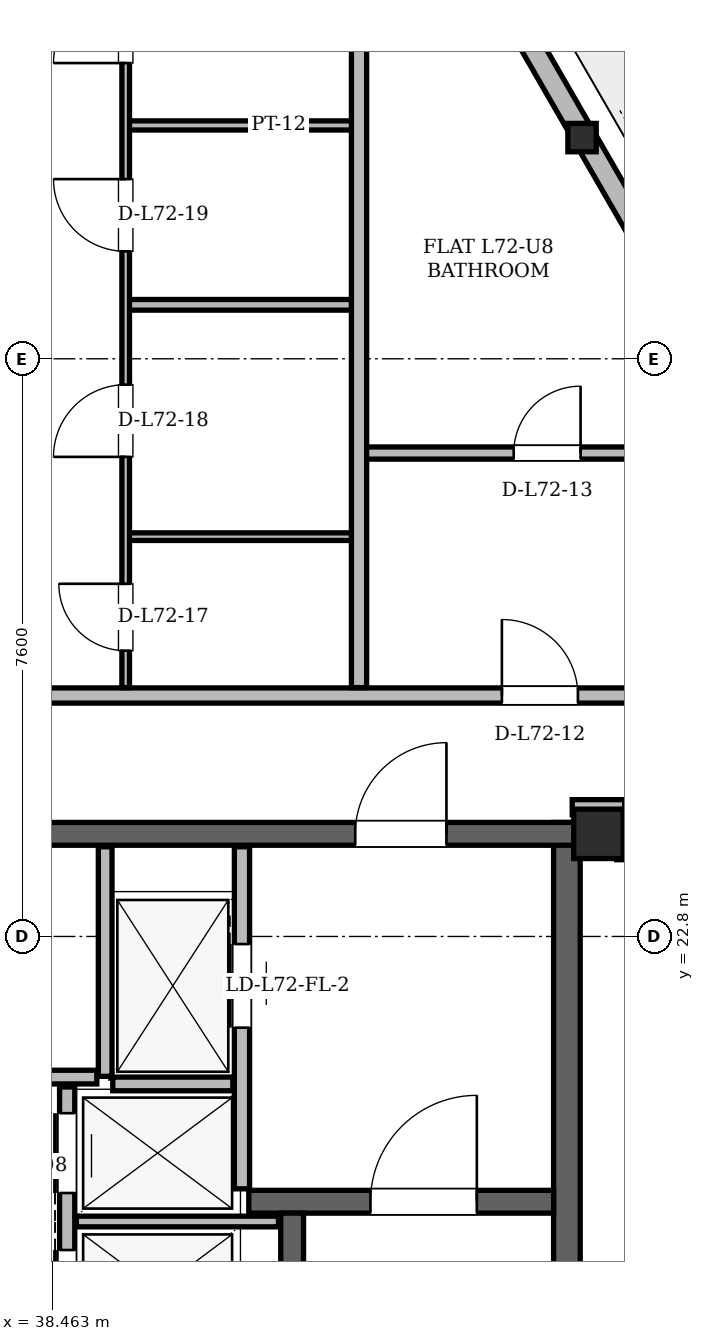
"""IFC4 building model, lengths in metres.
Left out: names, types, materials, properties, quantities, classifications, styles, units other than length and angle.
Written with IfcOpenShell. Run it as: python <this file> out.ifc"""

import sys

from ifc_helpers import new_model, si_unit, direction, frame, frame_2d, origin, origin_2d, place, context, subcontext, project, spatial, rectangle, hollow_rectangle, i_section, extrude, element, fill, save


model = new_model("IFC4")
c1 = context("Model", 3, precision=1e-05, world=origin(), true_north=direction((0.0, 1.0)))
c2 = subcontext(c1, "Body", "Model", "MODEL_VIEW")
j1 = project(units=[si_unit("LENGTHUNIT", "METRE"), si_unit("PLANEANGLEUNIT", "RADIAN")], contexts=[c1])
p1 = place(None, origin())
s1 = spatial("IfcSite", under=j1, at=p1, CompositionType="ELEMENT")
p2 = place(p1, origin())
s2 = spatial("IfcBuilding", under=s1, at=p2, CompositionType="ELEMENT")
p3 = place(p2, frame((0.0, 0.0, 273.3)))
s3 = spatial("IfcBuildingStorey", under=s2, at=p3, CompositionType="ELEMENT", Elevation=273.3)
p4 = place(p3, frame((45.65, 24.15, 0.0), z_axis=(0.0, 0.0, 1.0), x_axis=(1.0, 0.0, 0.0)))
e1 = element("IfcColumn", 1, at=p4, inside=s3, PredefinedType="COLUMN", context=c2, shape_type="SweptSolid", body=[
    extrude(hollow_rectangle(XDim=0.65, YDim=0.65, WallThickness=0.05, at=origin_2d()), origin(), (0.0, 0.0, 1.0), 3.9),
])
p5 = place(p3, frame((45.462, 33.321, 0.004), z_axis=(-0.01430375695, -0.005458012521, 0.99988279945), x_axis=(0.356506481981, -0.934292849328, 0.0)))
e2 = element("IfcColumn", 2, at=p5, inside=s3, PredefinedType="COLUMN", context=c2, shape_type="SweptSolid", body=[
    extrude(i_section(OverallWidth=0.373, OverallDepth=0.373, WebThickness=0.016, FlangeThickness=0.026, at=origin_2d()), origin(), (0.0, 0.0, 1.0), 3.892),
])
p6 = place(p3, frame((45.235, 11.0, 0.0), z_axis=(0.0, 0.0, 1.0), x_axis=(0.0, 1.0, 0.0)))
e3 = element("IfcWall", 3, at=p6, inside=s3, PredefinedType="SHEAR", context=c2, shape_type="SweptSolid", body=[
    extrude(rectangle(XDim=13.3, YDim=0.35, at=frame_2d((6.65, 0.0))), origin(), (0.0, 0.0, 1.0), 3.68),
])
p7 = place(p3, frame((29.65, 24.15, 0.0), z_axis=(0.0, 0.0, 1.0), x_axis=(1.0, 0.0, 0.0)))
e4 = element("IfcWall", 4, at=p7, inside=s3, PredefinedType="SHEAR", context=c2, shape_type="SweptSolid", body=[
    extrude(rectangle(XDim=15.7, YDim=0.3, at=frame_2d((7.85, 0.0))), origin(), (0.0, 0.0, 1.0), 3.68),
])
p8 = place(p7, frame((1.7, 0.0, 0.0)))
e5 = element("IfcOpeningElement", 5, at=p8, cuts=e4, PredefinedType="OPENING", context=c2, shape_type="SweptSolid", body=[
    extrude(rectangle(XDim=1.2, YDim=2.2, at=frame_2d((0.6, 1.1))), frame((0.0, 0.15, 0.0), z_axis=(0.0, -1.0, 0.0), x_axis=(1.0, 0.0, 0.0)), (0.0, 0.0, 1.0), 0.3),
])
p9 = place(p7, frame((12.8, 0.0, 0.0)))
e6 = element("IfcOpeningElement", 6, at=p9, cuts=e4, PredefinedType="OPENING", context=c2, shape_type="SweptSolid", body=[
    extrude(rectangle(XDim=1.2, YDim=2.2, at=frame_2d((0.6, 1.1))), frame((0.0, 0.15, 0.0), z_axis=(0.0, -1.0, 0.0), x_axis=(1.0, 0.0, 0.0)), (0.0, 0.0, 1.0), 0.3),
])
p10 = place(p7, frame((7.4, 0.0, 0.0)))
e7 = element("IfcOpeningElement", 7, at=p10, cuts=e4, PredefinedType="OPENING", context=c2, shape_type="SweptSolid", body=[
    extrude(rectangle(XDim=0.9, YDim=2.05, at=frame_2d((0.45, 1.025))), frame((0.0, 0.15, 0.0), z_axis=(0.0, -1.0, 0.0), x_axis=(1.0, 0.0, 0.0)), (0.0, 0.0, 1.0), 0.3),
])
p11 = place(p3, frame((41.05, 19.31, 0.0), z_axis=(0.0, 0.0, 1.0), x_axis=(1.0, 0.0, 0.0)))
e8 = element("IfcWall", 8, at=p11, inside=s3, PredefinedType="SHEAR", context=c2, shape_type="SweptSolid", body=[
    extrude(rectangle(XDim=4.01, YDim=0.3, at=frame_2d((2.005, 0.0))), origin(), (0.0, 0.0, 1.0), 3.68),
])
p12 = place(p11, frame((1.6, 0.0, 0.0)))
e9 = element("IfcOpeningElement", 9, at=p12, cuts=e8, PredefinedType="OPENING", context=c2, shape_type="SweptSolid", body=[
    extrude(rectangle(XDim=1.4, YDim=2.2, at=frame_2d((0.7, 1.1))), frame((0.0, 0.15, 0.0), z_axis=(0.0, -1.0, 0.0), x_axis=(1.0, 0.0, 0.0)), (0.0, 0.0, 1.0), 0.3),
])
p13 = place(p3, frame((41.62, 11.54, 0.0), z_axis=(0.0, 0.0, 1.0), x_axis=(0.0, 1.0, 0.0)))
e10 = element("IfcWall", 10, at=p13, inside=s3, PredefinedType="SHEAR", context=c2, shape_type="SweptSolid", body=[
    extrude(rectangle(XDim=7.62, YDim=0.3, at=frame_2d((3.81, 0.0))), origin(), (0.0, 0.0, 1.0), 3.68),
])
p14 = place(p3, frame((58.532, 10.683, 0.0), z_axis=(0.0, 0.0, 1.0), x_axis=(-0.499999381892, 0.866025760649, 0.0)))
e11 = element("IfcWall", 11, at=p14, inside=s3, PredefinedType="SOLIDWALL", context=c2, shape_type="SweptSolid", body=[
    extrude(rectangle(XDim=37.343, YDim=0.29, at=frame_2d((18.671, 0.0))), origin(), (0.0, 0.0, 1.0), 3.058),
])
p15 = place(p14, frame((6.789, 0.0, 0.0)))
e12 = element("IfcOpeningElement", 12, at=p15, cuts=e11, PredefinedType="OPENING", context=c2, shape_type="SweptSolid", body=[
    extrude(rectangle(XDim=1.5, YDim=2.2, at=frame_2d((0.75, 1.1))), frame((0.0, 0.145, 0.0), z_axis=(0.0, -1.0, 0.0), x_axis=(1.0, 0.0, 0.0)), (0.0, 0.0, 1.0), 0.29),
])
p16 = place(p14, frame((27.808, 0.0, 0.0)))
e13 = element("IfcOpeningElement", 13, at=p16, cuts=e11, PredefinedType="OPENING", context=c2, shape_type="SweptSolid", body=[
    extrude(rectangle(XDim=1.5, YDim=2.2, at=frame_2d((0.75, 1.1))), frame((0.0, 0.145, 0.0), z_axis=(0.0, -1.0, 0.0), x_axis=(1.0, 0.0, 0.0)), (0.0, 0.0, 1.0), 0.29),
])
p17 = place(p14, frame((0.901, 0.0, 0.85)))
e14 = element("IfcOpeningElement", 14, at=p17, cuts=e11, PredefinedType="OPENING", context=c2, shape_type="SweptSolid", body=[
    extrude(rectangle(XDim=1.2, YDim=1.48, at=frame_2d((0.6, 0.74))), frame((0.0, 0.145, 0.0), z_axis=(0.0, -1.0, 0.0), x_axis=(1.0, 0.0, 0.0)), (0.0, 0.0, 1.0), 0.29),
])
p18 = place(p14, frame((12.688, 0.0, 0.85)))
e15 = element("IfcOpeningElement", 15, at=p18, cuts=e11, PredefinedType="OPENING", context=c2, shape_type="SweptSolid", body=[
    extrude(rectangle(XDim=3.0, YDim=2.098, at=frame_2d((1.5, 1.049))), frame((0.0, 0.145, 0.0), z_axis=(0.0, -1.0, 0.0), x_axis=(1.0, 0.0, 0.0)), (0.0, 0.0, 1.0), 0.29),
])
p19 = place(p14, frame((17.814, 0.0, 0.85)))
e16 = element("IfcOpeningElement", 16, at=p19, cuts=e11, PredefinedType="OPENING", context=c2, shape_type="SweptSolid", body=[
    extrude(rectangle(XDim=2.6, YDim=1.95, at=frame_2d((1.3, 0.975))), frame((0.0, 0.145, 0.0), z_axis=(0.0, -1.0, 0.0), x_axis=(1.0, 0.0, 0.0)), (0.0, 0.0, 1.0), 0.29),
])
p20 = place(p14, frame((35.362, 0.0, 0.85)))
e17 = element("IfcOpeningElement", 17, at=p20, cuts=e11, PredefinedType="OPENING", context=c2, shape_type="SweptSolid", body=[
    extrude(rectangle(XDim=1.2, YDim=1.48, at=frame_2d((0.6, 0.74))), frame((0.0, 0.145, 0.0), z_axis=(0.0, -1.0, 0.0), x_axis=(1.0, 0.0, 0.0)), (0.0, 0.0, 1.0), 0.29),
])
p21 = place(p14, frame((33.788, 0.0, 0.85)))
e18 = element("IfcOpeningElement", 18, at=p21, cuts=e11, PredefinedType="OPENING", context=c2, shape_type="SweptSolid", body=[
    extrude(rectangle(XDim=1.2, YDim=1.48, at=frame_2d((0.6, 0.74))), frame((0.0, 0.145, 0.0), z_axis=(0.0, -1.0, 0.0), x_axis=(1.0, 0.0, 0.0)), (0.0, 0.0, 1.0), 0.29),
])
p22 = place(p14, frame((22.74, 0.0, 0.85)))
e19 = element("IfcOpeningElement", 19, at=p22, cuts=e11, PredefinedType="OPENING", context=c2, shape_type="SweptSolid", body=[
    extrude(rectangle(XDim=1.2, YDim=1.48, at=frame_2d((0.6, 0.74))), frame((0.0, 0.145, 0.0), z_axis=(0.0, -1.0, 0.0), x_axis=(1.0, 0.0, 0.0)), (0.0, 0.0, 1.0), 0.29),
])
p23 = place(p14, frame((31.705, 0.0, 0.85)))
e20 = element("IfcOpeningElement", 20, at=p23, cuts=e11, PredefinedType="OPENING", context=c2, shape_type="SweptSolid", body=[
    extrude(rectangle(XDim=1.2, YDim=1.48, at=frame_2d((0.6, 0.74))), frame((0.0, 0.145, 0.0), z_axis=(0.0, -1.0, 0.0), x_axis=(1.0, 0.0, 0.0)), (0.0, 0.0, 1.0), 0.29),
])
p24 = place(p3, frame((40.96, 19.48, 0.0), z_axis=(0.0, 0.0, 1.0), x_axis=(0.0, 1.0, 0.0)))
e21 = element("IfcWall", 21, at=p24, inside=s3, PredefinedType="PARTITIONING", context=c2, shape_type="SweptSolid", body=[
    extrude(rectangle(XDim=4.5, YDim=0.2, at=frame_2d((2.25, 0.0))), origin(), (0.0, 0.0, 1.0), 3.68),
])
p25 = place(p24, frame((2.12, 0.0, 0.0)))
e22 = element("IfcOpeningElement", 22, at=p25, cuts=e21, PredefinedType="OPENING", context=c2, shape_type="SweptSolid", body=[
    extrude(rectangle(XDim=1.1, YDim=2.2, at=frame_2d((0.55, 1.1))), frame((0.0, 0.1, 0.0), z_axis=(0.0, -1.0, 0.0), x_axis=(1.0, 0.0, 0.0)), (0.0, 0.0, 1.0), 0.2),
])
p26 = place(p3, frame((39.16, 20.96, 0.0), z_axis=(0.0, 0.0, 1.0), x_axis=(0.0, 1.0, 0.0)))
e23 = element("IfcWall", 23, at=p26, inside=s3, PredefinedType="PARTITIONING", context=c2, shape_type="SweptSolid", body=[
    extrude(rectangle(XDim=3.02, YDim=0.18, at=frame_2d((1.51, 0.0))), origin(), (0.0, 0.0, 1.0), 3.68),
])
p27 = place(p3, frame((39.26, 20.86, 0.0), z_axis=(0.0, 0.0, 1.0), x_axis=(1.0, 0.0, 0.0)))
e24 = element("IfcWall", 24, at=p27, inside=s3, PredefinedType="PARTITIONING", context=c2, shape_type="SweptSolid", body=[
    extrude(rectangle(XDim=1.58, YDim=0.18, at=frame_2d((0.79, 0.0))), origin(), (0.0, 0.0, 1.0), 3.68),
])
p28 = place(p3, frame((38.66, 17.2, 0.0), z_axis=(0.0, 0.0, 1.0), x_axis=(0.0, 1.0, 0.0)))
e25 = element("IfcWall", 25, at=p28, inside=s3, PredefinedType="PARTITIONING", context=c2, shape_type="SweptSolid", body=[
    extrude(rectangle(XDim=3.62, YDim=0.2, at=frame_2d((1.81, 0.0))), origin(), (0.0, 0.0, 1.0), 3.68),
])
p29 = place(p28, frame((0.425, 0.0, 0.0)))
e26 = element("IfcOpeningElement", 26, at=p29, cuts=e25, PredefinedType="OPENING", context=c2, shape_type="SweptSolid", body=[
    extrude(rectangle(XDim=1.05, YDim=2.15, at=frame_2d((0.525, 1.075))), frame((0.0, 0.1, 0.0), z_axis=(0.0, -1.0, 0.0), x_axis=(1.0, 0.0, 0.0)), (0.0, 0.0, 1.0), 0.2),
])
p30 = place(p28, frame((2.225, 0.0, 0.0)))
e27 = element("IfcOpeningElement", 27, at=p30, cuts=e25, PredefinedType="OPENING", context=c2, shape_type="SweptSolid", body=[
    extrude(rectangle(XDim=1.05, YDim=2.15, at=frame_2d((0.525, 1.075))), frame((0.0, 0.1, 0.0), z_axis=(0.0, -1.0, 0.0), x_axis=(1.0, 0.0, 0.0)), (0.0, 0.0, 1.0), 0.2),
])
p31 = place(p3, frame((38.78, 19.05, 0.0), z_axis=(0.0, 0.0, 1.0), x_axis=(1.0, 0.0, 0.0)))
e28 = element("IfcWall", 28, at=p31, inside=s3, PredefinedType="PARTITIONING", context=c2, shape_type="SweptSolid", body=[
    extrude(rectangle(XDim=2.66, YDim=0.14, at=frame_2d((1.33, 0.0))), origin(), (0.0, 0.0, 1.0), 3.68),
])
p32 = place(p3, frame((35.95, 20.95, 0.0), z_axis=(0.0, 0.0, 1.0), x_axis=(1.0, 0.0, 0.0)))
e29 = element("IfcWall", 29, at=p32, inside=s3, PredefinedType="PARTITIONING", context=c2, shape_type="SweptSolid", body=[
    extrude(rectangle(XDim=3.1, YDim=0.18, at=frame_2d((1.55, 0.0))), origin(), (0.0, 0.0, 1.0), 3.68),
])
p33 = place(p3, frame((45.305, 24.5, 0.0), z_axis=(0.0, 0.0, 1.0), x_axis=(1.0, 0.0, 0.0)))
e30 = element("IfcWall", 30, at=p33, inside=s3, PredefinedType="PARTITIONING", context=c2, shape_type="SweptSolid", body=[
    extrude(rectangle(XDim=0.69, YDim=0.2, at=frame_2d((0.345, 0.0))), origin(), (0.0, 0.0, 1.0), 3.266),
])
p34 = place(p3, frame((25.6, 25.97, 0.0), z_axis=(0.0, 0.0, 1.0), x_axis=(1.0, 0.0, 0.0)))
e31 = element("IfcWall", 31, at=p34, inside=s3, PredefinedType="PARTITIONING", context=c2, shape_type="SweptSolid", body=[
    extrude(rectangle(XDim=21.85, YDim=0.2, at=frame_2d((10.925, 0.0))), origin(), (0.0, 0.0, 1.0), 3.266),
])
p35 = place(p34, frame((3.971, 0.0, 0.0)))
e32 = element("IfcOpeningElement", 32, at=p35, cuts=e31, PredefinedType="OPENING", context=c2, shape_type="SweptSolid", body=[
    extrude(rectangle(XDim=1.0, YDim=2.18, at=frame_2d((0.5, 1.09))), frame((0.0, 0.1, 0.0), z_axis=(0.0, -1.0, 0.0), x_axis=(1.0, 0.0, 0.0)), (0.0, 0.0, 1.0), 0.2),
])
p36 = place(p34, frame((11.388, 0.0, 0.0)))
e33 = element("IfcOpeningElement", 33, at=p36, cuts=e31, PredefinedType="OPENING", context=c2, shape_type="SweptSolid", body=[
    extrude(rectangle(XDim=1.0, YDim=2.18, at=frame_2d((0.5, 1.09))), frame((0.0, 0.1, 0.0), z_axis=(0.0, -1.0, 0.0), x_axis=(1.0, 0.0, 0.0)), (0.0, 0.0, 1.0), 0.2),
])
p37 = place(p34, frame((18.78, 0.0, 0.0)))
e34 = element("IfcOpeningElement", 34, at=p37, cuts=e31, PredefinedType="OPENING", context=c2, shape_type="SweptSolid", body=[
    extrude(rectangle(XDim=1.0, YDim=2.18, at=frame_2d((0.5, 1.09))), frame((0.0, 0.1, 0.0), z_axis=(0.0, -1.0, 0.0), x_axis=(1.0, 0.0, 0.0)), (0.0, 0.0, 1.0), 0.2),
])
p38 = place(p3, frame((39.43, 28.06, 0.0), z_axis=(0.0, 0.0, 1.0), x_axis=(1.0, 0.0, 0.0)))
e35 = element("IfcWall", 35, at=p38, inside=s3, PredefinedType="PARTITIONING", context=c2, shape_type="SweptSolid", body=[
    extrude(rectangle(XDim=3.12, YDim=0.1, at=frame_2d((1.56, 0.0))), origin(), (0.0, 0.0, 1.0), 3.68),
])
p39 = place(p3, frame((42.418, 29.16, 0.0), z_axis=(0.0, 0.0, 1.0), x_axis=(1.0, 0.0, 0.0)))
e36 = element("IfcWall", 36, at=p39, inside=s3, PredefinedType="PARTITIONING", context=c2, shape_type="SweptSolid", body=[
    extrude(rectangle(XDim=5.114, YDim=0.16, at=frame_2d((2.557, 0.0))), origin(), (0.0, 0.0, 1.0), 3.266),
])
p40 = place(p39, frame((2.117, 0.0, 0.0)))
e37 = element("IfcOpeningElement", 37, at=p40, cuts=e36, PredefinedType="OPENING", context=c2, shape_type="SweptSolid", body=[
    extrude(rectangle(XDim=0.88, YDim=2.08, at=frame_2d((0.44, 1.04))), frame((0.0, 0.08, 0.0), z_axis=(0.0, -1.0, 0.0), x_axis=(1.0, 0.0, 0.0)), (0.0, 0.0, 1.0), 0.16),
])
p41 = place(p3, frame((39.43, 31.11, 0.0), z_axis=(0.0, 0.0, 1.0), x_axis=(1.0, 0.0, 0.0)))
e38 = element("IfcWall", 38, at=p41, inside=s3, PredefinedType="PARTITIONING", context=c2, shape_type="SweptSolid", body=[
    extrude(rectangle(XDim=3.12, YDim=0.14, at=frame_2d((1.56, 0.0))), origin(), (0.0, 0.0, 1.0), 3.68),
])
p42 = place(p3, frame((39.43, 33.47, 0.0), z_axis=(0.0, 0.0, 1.0), x_axis=(1.0, 0.0, 0.0)))
e39 = element("IfcWall", 39, at=p42, inside=s3, PredefinedType="PARTITIONING", context=c2, shape_type="SweptSolid", body=[
    extrude(rectangle(XDim=3.12, YDim=0.12, at=frame_2d((1.56, 0.0))), origin(), (0.0, 0.0, 1.0), 3.68),
])
p43 = place(p3, frame((39.43, 26.074, 0.0), z_axis=(0.0, 0.0, 1.0), x_axis=(0.0, 1.0, 0.0)))
e40 = element("IfcWall", 40, at=p43, inside=s3, PredefinedType="PARTITIONING", context=c2, shape_type="SweptSolid", body=[
    extrude(rectangle(XDim=16.8, YDim=0.1, at=frame_2d((8.4, 0.0))), origin(), (0.0, 0.0, 1.0), 3.68),
])
p44 = place(p43, frame((0.486, 0.0, 0.0)))
e41 = element("IfcOpeningElement", 41, at=p44, cuts=e40, PredefinedType="OPENING", context=c2, shape_type="SweptSolid", body=[
    extrude(rectangle(XDim=0.88, YDim=2.08, at=frame_2d((0.44, 1.04))), frame((0.0, 0.05, 0.0), z_axis=(0.0, -1.0, 0.0), x_axis=(1.0, 0.0, 0.0)), (0.0, 0.0, 1.0), 0.1),
])
p45 = place(p43, frame((3.036, 0.0, 0.0)))
e42 = element("IfcOpeningElement", 42, at=p45, cuts=e40, PredefinedType="OPENING", context=c2, shape_type="SweptSolid", body=[
    extrude(rectangle(XDim=0.95, YDim=2.1, at=frame_2d((0.475, 1.05))), frame((0.0, 0.05, 0.0), z_axis=(0.0, -1.0, 0.0), x_axis=(1.0, 0.0, 0.0)), (0.0, 0.0, 1.0), 0.1),
])
p46 = place(p43, frame((5.74, 0.0, 0.0)))
e43 = element("IfcOpeningElement", 43, at=p46, cuts=e40, PredefinedType="OPENING", context=c2, shape_type="SweptSolid", body=[
    extrude(rectangle(XDim=0.95, YDim=2.1, at=frame_2d((0.475, 1.05))), frame((0.0, 0.05, 0.0), z_axis=(0.0, -1.0, 0.0), x_axis=(1.0, 0.0, 0.0)), (0.0, 0.0, 1.0), 0.1),
])
p47 = place(p43, frame((8.217, 0.0, 0.0)))
e44 = element("IfcOpeningElement", 44, at=p47, cuts=e40, PredefinedType="OPENING", context=c2, shape_type="SweptSolid", body=[
    extrude(rectangle(XDim=0.95, YDim=2.1, at=frame_2d((0.475, 1.05))), frame((0.0, 0.05, 0.0), z_axis=(0.0, -1.0, 0.0), x_axis=(1.0, 0.0, 0.0)), (0.0, 0.0, 1.0), 0.1),
])
p48 = place(p43, frame((11.18, 0.0, 0.0)))
e45 = element("IfcOpeningElement", 45, at=p48, cuts=e40, PredefinedType="OPENING", context=c2, shape_type="SweptSolid", body=[
    extrude(rectangle(XDim=0.92, YDim=2.12, at=frame_2d((0.46, 1.06))), frame((0.0, 0.05, 0.0), z_axis=(0.0, -1.0, 0.0), x_axis=(1.0, 0.0, 0.0)), (0.0, 0.0, 1.0), 0.1),
])
p49 = place(p43, frame((14.585, 0.0, 0.0)))
e46 = element("IfcOpeningElement", 46, at=p49, cuts=e40, PredefinedType="OPENING", context=c2, shape_type="SweptSolid", body=[
    extrude(rectangle(XDim=0.95, YDim=2.1, at=frame_2d((0.475, 1.05))), frame((0.0, 0.05, 0.0), z_axis=(0.0, -1.0, 0.0), x_axis=(1.0, 0.0, 0.0)), (0.0, 0.0, 1.0), 0.1),
])
p50 = place(p3, frame((42.5, 26.074, 0.0), z_axis=(0.0, 0.0, 1.0), x_axis=(0.0, 1.0, 0.0)))
e47 = element("IfcWall", 47, at=p50, inside=s3, PredefinedType="PARTITIONING", context=c2, shape_type="SweptSolid", body=[
    extrude(rectangle(XDim=12.08, YDim=0.2, at=frame_2d((6.04, 0.0))), origin(), (0.0, 0.0, 1.0), 3.058),
])
p51 = place(p3, frame((45.99, 23.81, 0.0), z_axis=(0.0, 0.0, 1.0), x_axis=(0.0, 1.0, 0.0)))
e48 = element("IfcWall", 48, at=p51, inside=s3, PredefinedType="PARTITIONING", context=c2, shape_type="SweptSolid", body=[
    extrude(rectangle(XDim=0.51, YDim=0.2, at=frame_2d((0.255, 0.0))), origin(), (0.0, 0.0, 1.0), 3.68),
])
p52 = place(p25, origin())
e49 = element("IfcDoor", 49, at=p52, inside=s3, OperationType="SLIDING_TO_RIGHT", PredefinedType="DOOR", context=c2, shape_type="SweptSolid", body=[
    extrude(rectangle(XDim=1.1, YDim=2.2, at=frame_2d((0.55, 1.1))), frame((0.0, 0.025, 0.0), z_axis=(0.0, -1.0, 0.0), x_axis=(1.0, 0.0, 0.0)), (0.0, 0.0, 1.0), 0.05),
])
fill(e22, e49)
p53 = place(p29, origin())
e50 = element("IfcDoor", 50, at=p53, inside=s3, OperationType="SLIDING_TO_RIGHT", PredefinedType="DOOR", context=c2, shape_type="SweptSolid", body=[
    extrude(rectangle(XDim=1.05, YDim=2.15, at=frame_2d((0.525, 1.075))), frame((0.0, 0.025, 0.0), z_axis=(0.0, -1.0, 0.0), x_axis=(1.0, 0.0, 0.0)), (0.0, 0.0, 1.0), 0.05),
])
fill(e26, e50)
p54 = place(p30, origin())
e51 = element("IfcDoor", 51, at=p54, inside=s3, OperationType="SLIDING_TO_LEFT", PredefinedType="DOOR", context=c2, shape_type="SweptSolid", body=[
    extrude(rectangle(XDim=1.05, YDim=2.15, at=frame_2d((0.525, 1.075))), frame((0.0, 0.025, 0.0), z_axis=(0.0, -1.0, 0.0), x_axis=(1.0, 0.0, 0.0)), (0.0, 0.0, 1.0), 0.05),
])
fill(e27, e51)
p55 = place(p12, origin())
e52 = element("IfcDoor", 52, at=p55, inside=s3, OperationType="SINGLE_SWING_RIGHT", PredefinedType="DOOR", context=c2, shape_type="SweptSolid", body=[
    extrude(rectangle(XDim=1.4, YDim=2.2, at=frame_2d((0.7, 1.1))), frame((0.0, 0.025, 0.0), z_axis=(0.0, -1.0, 0.0), x_axis=(1.0, 0.0, 0.0)), (0.0, 0.0, 1.0), 0.05),
])
fill(e9, e52)
p56 = place(p9, origin())
e53 = element("IfcDoor", 53, at=p56, inside=s3, OperationType="SINGLE_SWING_RIGHT", PredefinedType="DOOR", context=c2, shape_type="SweptSolid", body=[
    extrude(rectangle(XDim=1.2, YDim=2.2, at=frame_2d((0.6, 1.1))), frame((0.0, 0.025, 0.0), z_axis=(0.0, -1.0, 0.0), x_axis=(1.0, 0.0, 0.0)), (0.0, 0.0, 1.0), 0.05),
])
fill(e6, e53)
p57 = place(p37, origin())
e54 = element("IfcDoor", 54, at=p57, inside=s3, OperationType="SINGLE_SWING_LEFT", PredefinedType="DOOR", context=c2, shape_type="SweptSolid", body=[
    extrude(rectangle(XDim=1.0, YDim=2.18, at=frame_2d((0.5, 1.09))), frame((0.0, 0.025, 0.0), z_axis=(0.0, -1.0, 0.0), x_axis=(1.0, 0.0, 0.0)), (0.0, 0.0, 1.0), 0.05),
])
fill(e34, e54)
p58 = place(p40, origin())
e55 = element("IfcDoor", 55, at=p58, inside=s3, OperationType="SINGLE_SWING_RIGHT", PredefinedType="DOOR", context=c2, shape_type="SweptSolid", body=[
    extrude(rectangle(XDim=0.88, YDim=2.08, at=frame_2d((0.44, 1.04))), frame((0.0, 0.025, 0.0), z_axis=(0.0, -1.0, 0.0), x_axis=(1.0, 0.0, 0.0)), (0.0, 0.0, 1.0), 0.05),
])
fill(e37, e55)
p59 = place(p44, origin())
e56 = element("IfcDoor", 56, at=p59, inside=s3, OperationType="SINGLE_SWING_RIGHT", PredefinedType="DOOR", context=c2, shape_type="SweptSolid", body=[
    extrude(rectangle(XDim=0.88, YDim=2.08, at=frame_2d((0.44, 1.04))), frame((0.0, 0.025, 0.0), z_axis=(0.0, -1.0, 0.0), x_axis=(1.0, 0.0, 0.0)), (0.0, 0.0, 1.0), 0.05),
])
fill(e41, e56)
p60 = place(p45, origin())
e57 = element("IfcDoor", 57, at=p60, inside=s3, OperationType="SINGLE_SWING_LEFT", PredefinedType="DOOR", context=c2, shape_type="SweptSolid", body=[
    extrude(rectangle(XDim=0.95, YDim=2.1, at=frame_2d((0.475, 1.05))), frame((0.0, 0.025, 0.0), z_axis=(0.0, -1.0, 0.0), x_axis=(1.0, 0.0, 0.0)), (0.0, 0.0, 1.0), 0.05),
])
fill(e42, e57)
p61 = place(p46, origin())
e58 = element("IfcDoor", 58, at=p61, inside=s3, OperationType="SINGLE_SWING_RIGHT", PredefinedType="DOOR", context=c2, shape_type="SweptSolid", body=[
    extrude(rectangle(XDim=0.95, YDim=2.1, at=frame_2d((0.475, 1.05))), frame((0.0, 0.025, 0.0), z_axis=(0.0, -1.0, 0.0), x_axis=(1.0, 0.0, 0.0)), (0.0, 0.0, 1.0), 0.05),
])
fill(e43, e58)
p62 = place(p47, origin())
e59 = element("IfcDoor", 59, at=p62, inside=s3, OperationType="SINGLE_SWING_LEFT", PredefinedType="DOOR", context=c2, shape_type="SweptSolid", body=[
    extrude(rectangle(XDim=0.95, YDim=2.1, at=frame_2d((0.475, 1.05))), frame((0.0, 0.025, 0.0), z_axis=(0.0, -1.0, 0.0), x_axis=(1.0, 0.0, 0.0)), (0.0, 0.0, 1.0), 0.05),
])
fill(e44, e59)
save(model, sys.argv[1])
